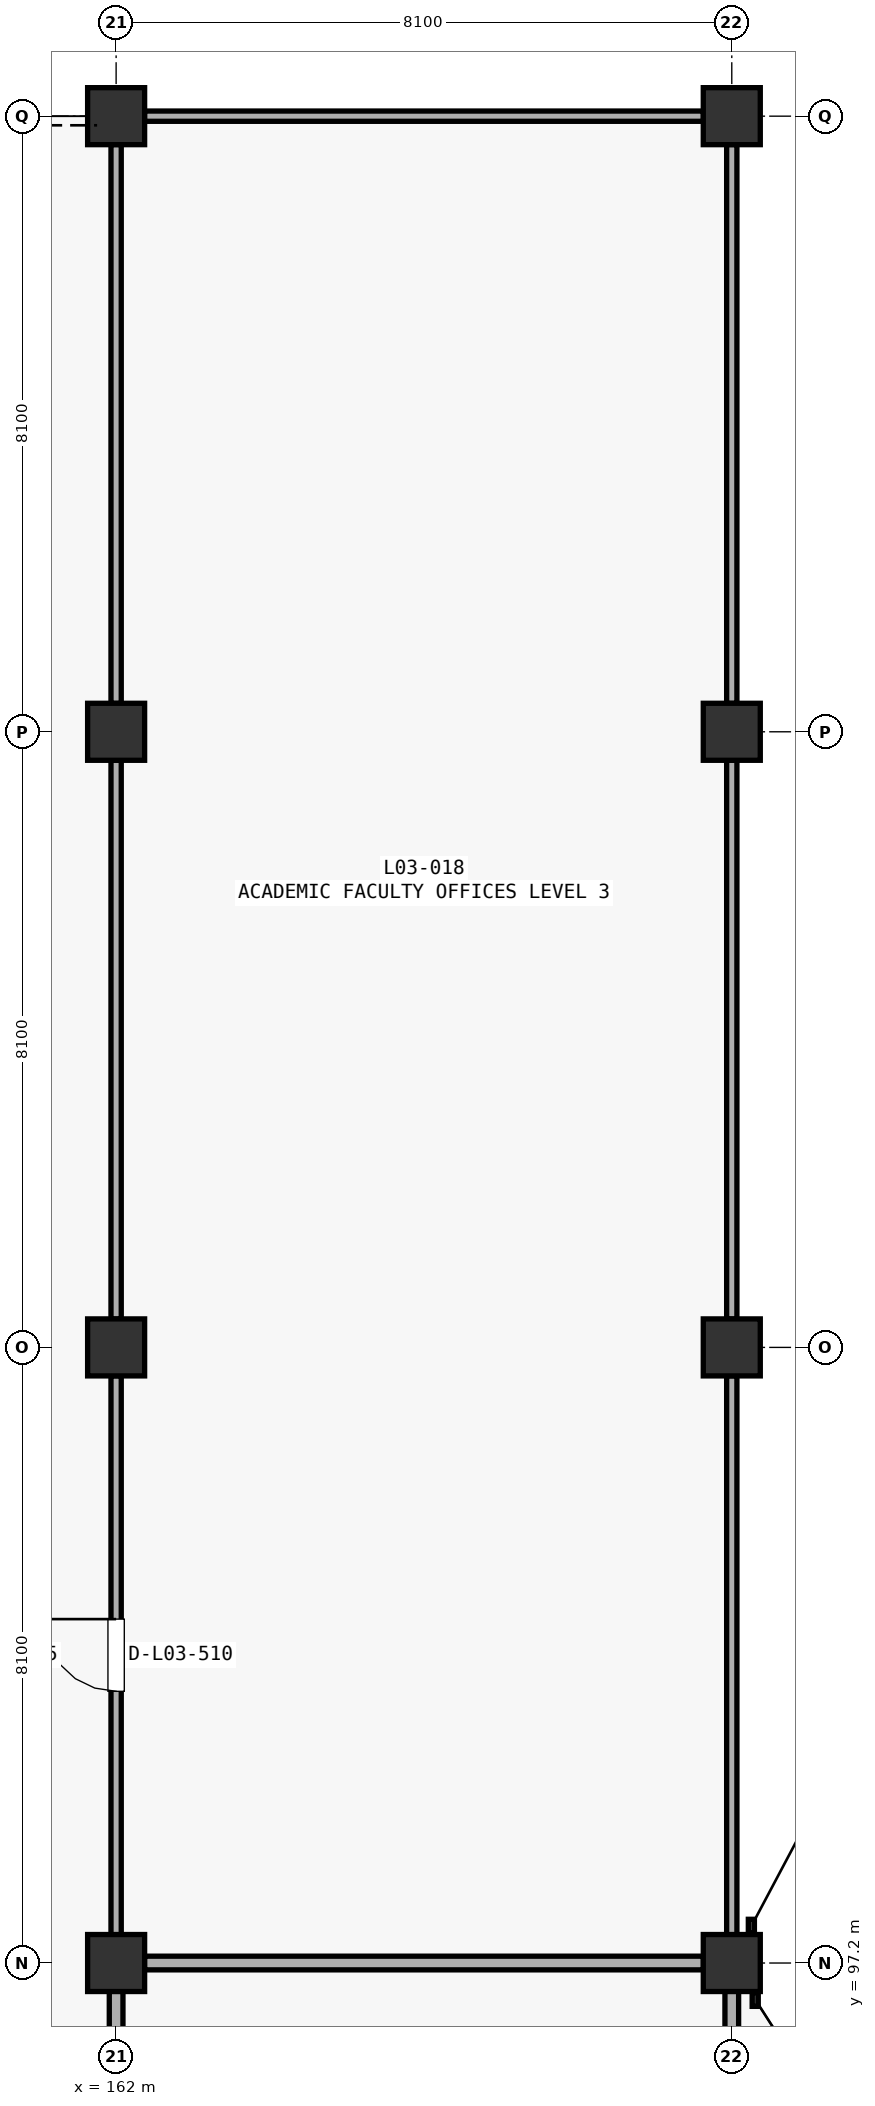
"""IFC4 building model, lengths in metres.
Left out: names, types, materials, properties, quantities, classifications, styles, units other than length and angle.
Written with IfcOpenShell. Run it as: python <this file> out.ifc"""

import sys

from ifc_helpers import new_model, si_unit, direction, frame, frame_2d, origin, origin_2d, place, context, subcontext, project, spatial, rectangle, extrude, element, fill, save


model = new_model("IFC4")
c1 = context("Model", 3, precision=1e-05, world=origin(), true_north=direction((0.0, 1.0)))
c2 = subcontext(c1, "Body", "Model", "MODEL_VIEW")
j1 = project(units=[si_unit("LENGTHUNIT", "METRE"), si_unit("PLANEANGLEUNIT", "RADIAN")], contexts=[c1])
p1 = place(None, origin())
s1 = spatial("IfcSite", under=j1, at=p1, CompositionType="ELEMENT")
p2 = place(p1, origin())
s2 = spatial("IfcBuilding", under=s1, at=p2, CompositionType="ELEMENT")
p3 = place(p2, frame((0.0, 0.0, 14.11)))
s3 = spatial("IfcBuildingStorey", under=s2, at=p3, CompositionType="ELEMENT", Elevation=14.11)
for number, where, z_axis, x_axis in (
    (1, (162.0, 97.2, 0.0), (0.0, 0.0, 1.0), (1.0, 0.0, 0.0)),
    (2, (162.0, 105.3, 0.0), (0.0, 0.0, 1.0), (1.0, 0.0, 0.0)),
    (3, (162.0, 113.4, 0.0), (0.0, 0.0, 1.0), (1.0, 0.0, 0.0)),
    (4, (162.0, 121.5, 0.0), (0.0, 0.0, 1.0), (1.0, 0.0, 0.0)),
    (5, (170.1, 97.2, 0.0), (0.0, 0.0, 1.0), (1.0, 0.0, 0.0)),
    (6, (170.1, 105.3, 0.0), (0.0, 0.0, 1.0), (1.0, 0.0, 0.0)),
    (7, (170.1, 113.4, 0.0), (0.0, 0.0, 1.0), (1.0, 0.0, 0.0)),
    (8, (170.1, 121.5, 0.0), (0.0, 0.0, 1.0), (1.0, 0.0, 0.0)),
):
    element("IfcColumn", number, at=place(p3, frame(where, z_axis=z_axis, x_axis=x_axis)), inside=s3, PredefinedType="COLUMN", context=c2, shape_type="SweptSolid", body=[
        extrude(rectangle(XDim=0.75, YDim=0.75, at=origin_2d()), origin(), (0.0, 0.0, 1.0), 4.42),
    ])
p4 = place(p3, frame((162.0, 89.473, 0.0), z_axis=(0.0, 0.0, 1.0), x_axis=(0.0, 1.0, 0.0)))
e9 = element("IfcWall", 9, at=p4, inside=s3, PredefinedType="PARTITIONING", context=c2, shape_type="SweptSolid", body=[
    extrude(rectangle(XDim=7.354, YDim=0.18, at=frame_2d((3.677, 0.0))), origin(), (0.0, 0.0, 1.0), 3.412),
])
for number, where, z_axis, x_axis in (
    (10, (162.373, 97.2, 0.0), (0.0, 0.0, 1.0), (1.0, 0.0, 0.0)),
    (11, (170.1, 89.473, 0.0), (0.0, 0.0, 1.0), (0.0, 1.0, 0.0)),
):
    element("IfcWall", number, at=place(p3, frame(where, z_axis=z_axis, x_axis=x_axis)), inside=s3, PredefinedType="PARTITIONING", context=c2, shape_type="SweptSolid", body=[
        extrude(rectangle(XDim=7.354, YDim=0.18, at=frame_2d((3.677, 0.0))), origin(), (0.0, 0.0, 1.0), 3.512),
    ])
p5 = place(p3, frame((162.0, 97.573, 0.0), z_axis=(0.0, 0.0, 1.0), x_axis=(0.0, 1.0, 0.0)))
e12 = element("IfcWall", 12, at=p5, inside=s3, PredefinedType="PARTITIONING", context=c2, shape_type="SweptSolid", body=[
    extrude(rectangle(XDim=7.354, YDim=0.135, at=frame_2d((3.677, 0.0))), origin(), (0.0, 0.0, 1.0), 3.512),
])
p6 = place(p5, frame((3.202, 0.0, 0.0)))
e13 = element("IfcOpeningElement", 13, at=p6, cuts=e12, PredefinedType="OPENING", context=c2, shape_type="SweptSolid", body=[
    extrude(rectangle(XDim=0.95, YDim=2.15, at=frame_2d((0.475, 1.075))), frame((0.0, 0.078, 0.0), z_axis=(0.0, -1.0, 0.0), x_axis=(1.0, 0.0, 0.0)), (0.0, 0.0, 1.0), 0.155),
])
p7 = place(p3, frame((162.0, 105.673, 0.0), z_axis=(0.0, 0.0, 1.0), x_axis=(0.0, 1.0, 0.0)))
e14 = element("IfcWall", 14, at=p7, inside=s3, PredefinedType="PARTITIONING", context=c2, shape_type="SweptSolid", body=[
    extrude(rectangle(XDim=7.354, YDim=0.135, at=frame_2d((3.677, 0.0))), origin(), (0.0, 0.0, 1.0), 3.562),
])
p8 = place(p3, frame((162.0, 113.773, 0.0), z_axis=(0.0, 0.0, 1.0), x_axis=(0.0, 1.0, 0.0)))
e15 = element("IfcWall", 15, at=p8, inside=s3, PredefinedType="PARTITIONING", context=c2, shape_type="SweptSolid", body=[
    extrude(rectangle(XDim=7.354, YDim=0.135, at=frame_2d((3.677, 0.0))), origin(), (0.0, 0.0, 1.0), 3.312),
])
p9 = place(p3, frame((162.373, 121.5, 0.0), z_axis=(0.0, 0.0, 1.0), x_axis=(1.0, 0.0, 0.0)))
e16 = element("IfcWall", 16, at=p9, inside=s3, PredefinedType="PARTITIONING", context=c2, shape_type="SweptSolid", body=[
    extrude(rectangle(XDim=7.354, YDim=0.135, at=frame_2d((3.677, 0.0))), origin(), (0.0, 0.0, 1.0), 3.212),
])
p10 = place(p3, frame((170.1, 97.573, 0.0), z_axis=(0.0, 0.0, 1.0), x_axis=(0.0, 1.0, 0.0)))
e17 = element("IfcWall", 17, at=p10, inside=s3, PredefinedType="PARTITIONING", context=c2, shape_type="SweptSolid", body=[
    extrude(rectangle(XDim=7.354, YDim=0.135, at=frame_2d((3.677, 0.0))), origin(), (0.0, 0.0, 1.0), 3.312),
])
p11 = place(p3, frame((170.1, 105.673, 0.0), z_axis=(0.0, 0.0, 1.0), x_axis=(0.0, 1.0, 0.0)))
e18 = element("IfcWall", 18, at=p11, inside=s3, PredefinedType="PARTITIONING", context=c2, shape_type="SweptSolid", body=[
    extrude(rectangle(XDim=7.354, YDim=0.135, at=frame_2d((3.677, 0.0))), origin(), (0.0, 0.0, 1.0), 3.212),
])
p12 = place(p3, frame((170.1, 113.773, 0.0), z_axis=(0.0, 0.0, 1.0), x_axis=(0.0, 1.0, 0.0)))
e19 = element("IfcWall", 19, at=p12, inside=s3, PredefinedType="PARTITIONING", context=c2, shape_type="SweptSolid", body=[
    extrude(rectangle(XDim=7.354, YDim=0.135, at=frame_2d((3.677, 0.0))), origin(), (0.0, 0.0, 1.0), 3.412),
])
p13 = place(p6, origin())
e20 = element("IfcDoor", 20, at=p13, inside=s3, OperationType="SINGLE_SWING_RIGHT", PredefinedType="DOOR", context=c2, shape_type="SweptSolid", body=[
    extrude(rectangle(XDim=0.95, YDim=2.15, at=frame_2d((0.475, 1.075))), frame((0.0, 0.025, 0.0), z_axis=(0.0, -1.0, 0.0), x_axis=(1.0, 0.0, 0.0)), (0.0, 0.0, 1.0), 0.05),
])
fill(e13, e20)
save(model, sys.argv[1])
